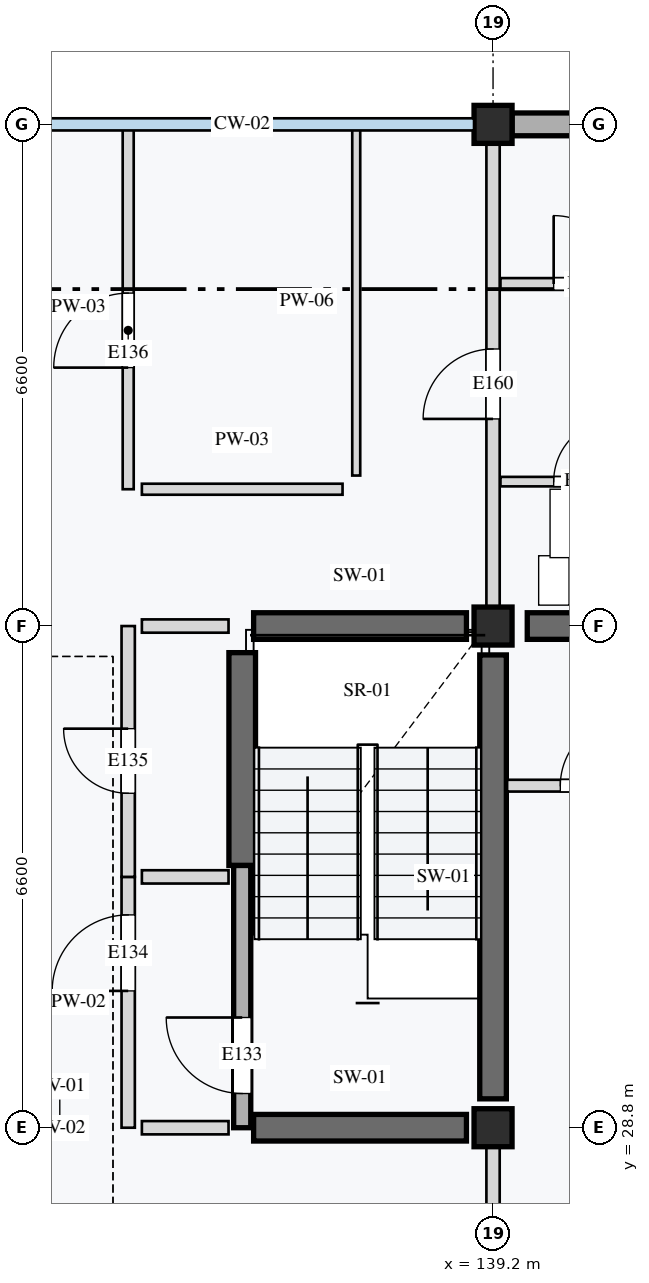
"""IFC4 building model, lengths in metres.
Left out: names, types, materials, properties, quantities, classifications, styles, units other than length and angle.
Written with IfcOpenShell. Run it as: python <this file> out.ifc"""

import sys

from ifc_helpers import new_model, si_unit, direction, frame, frame_2d, origin, origin_2d, place, context, subcontext, project, spatial, rectangle, extrude, element, fill, save


model = new_model("IFC4")
c1 = context("Model", 3, precision=1e-05, world=origin(), true_north=direction((0.0, 1.0)))
c2 = subcontext(c1, "Body", "Model", "MODEL_VIEW")
j1 = project(units=[si_unit("LENGTHUNIT", "METRE"), si_unit("PLANEANGLEUNIT", "RADIAN")], contexts=[c1])
p1 = place(None, origin())
s1 = spatial("IfcSite", under=j1, at=p1, CompositionType="ELEMENT")
p2 = place(p1, origin())
s2 = spatial("IfcBuilding", under=s1, at=p2, CompositionType="ELEMENT")
p3 = place(p2, frame((0.0, 0.0, 8.4)))
s3 = spatial("IfcBuildingStorey", under=s2, at=p3, CompositionType="ELEMENT", Elevation=8.4)
for number, where, z_axis, x_axis in (
    (1, (139.2, 28.8, 0.0), (0.0, 0.0, 1.0), (1.0, 0.0, 0.0)),
    (2, (139.2, 35.4, 0.0), (0.0, 0.0, 1.0), (1.0, 0.0, 0.0)),
    (3, (139.2, 42.0, 0.0), (0.0, 0.0, 1.0), (1.0, 0.0, 0.0)),
):
    element("IfcColumn", number, at=place(p3, frame(where, z_axis=z_axis, x_axis=x_axis)), inside=s3, PredefinedType="COLUMN", context=c2, shape_type="SweptSolid", body=[
        extrude(rectangle(XDim=0.5, YDim=0.5, at=origin_2d()), origin(), (0.0, 0.0, 1.0), 3.2),
    ])
p4 = place(p3, frame((139.2, 29.18, 0.0), z_axis=(0.0, 0.0, 1.0), x_axis=(0.0, 1.0, 0.0)))
e4 = element("IfcWall", 4, at=p4, inside=s3, PredefinedType="SHEAR", context=c2, shape_type="SweptSolid", body=[
    extrude(rectangle(XDim=5.84, YDim=0.35, at=frame_2d((2.92, 0.0))), origin(), (0.0, 0.0, 1.0), 2.96),
])
for number, where, z_axis, x_axis in (
    (5, (135.9, 32.25, 0.0), (0.0, 0.0, 1.0), (0.0, 1.0, 0.0)),
    (6, (136.05, 28.8, 0.0), (0.0, 0.0, 1.0), (1.0, 0.0, 0.0)),
    (7, (136.05, 35.4, 0.0), (0.0, 0.0, 1.0), (1.0, 0.0, 0.0)),
):
    element("IfcWall", number, at=place(p3, frame(where, z_axis=z_axis, x_axis=x_axis)), inside=s3, PredefinedType="SHEAR", context=c2, shape_type="SweptSolid", body=[
        extrude(rectangle(XDim=2.8, YDim=0.35, at=frame_2d((1.4, 0.0))), origin(), (0.0, 0.0, 1.0), 2.96),
    ])
p5 = place(p3, frame((139.65, 35.4, 0.0), z_axis=(0.0, 0.0, 1.0), x_axis=(1.0, 0.0, 0.0)))
e8 = element("IfcWall", 8, at=p5, inside=s3, PredefinedType="SHEAR", context=c2, shape_type="SweptSolid", body=[
    extrude(rectangle(XDim=5.7, YDim=0.35, at=frame_2d((2.85, 0.0))), origin(), (0.0, 0.0, 1.0), 2.96),
])
p6 = place(p3, frame((139.45, 42.0, 0.0), z_axis=(0.0, 0.0, 1.0), x_axis=(1.0, 0.0, 0.0)))
e9 = element("IfcWall", 9, at=p6, inside=s3, PredefinedType="STANDARD", context=c2, shape_type="SweptSolid", body=[
    extrude(rectangle(XDim=4.0, YDim=0.3, at=frame_2d((2.0, 0.0))), origin(), (0.0, 0.0, 1.0), 2.65),
])
p7 = place(p3, frame((135.9, 28.8, 0.0), z_axis=(0.0, 0.0, 1.0), x_axis=(0.0, 1.0, 0.0)))
e10 = element("IfcWall", 10, at=p7, inside=s3, PredefinedType="STANDARD", context=c2, shape_type="SweptSolid", body=[
    extrude(rectangle(XDim=3.45, YDim=0.225, at=frame_2d((1.725, 0.0))), origin(), (0.0, 0.0, 1.0), 2.96),
])
p8 = place(p7, frame((0.45, 0.0, 0.0)))
e11 = element("IfcOpeningElement", 11, at=p8, cuts=e10, PredefinedType="OPENING", context=c2, shape_type="SweptSolid", body=[
    extrude(rectangle(XDim=1.0, YDim=2.1, at=frame_2d((0.5, 1.05))), frame((0.0, 0.123, 0.0), z_axis=(0.0, -1.0, 0.0), x_axis=(1.0, 0.0, 0.0)), (0.0, 0.0, 1.0), 0.245),
])
p9 = place(p3, frame((134.4, 28.8, 0.0), z_axis=(0.0, 0.0, 1.0), x_axis=(0.0, 1.0, 0.0)))
e12 = element("IfcWall", 12, at=p9, inside=s3, PredefinedType="PARTITIONING", context=c2, shape_type="SweptSolid", body=[
    extrude(rectangle(XDim=3.3, YDim=0.175, at=frame_2d((1.65, 0.0))), origin(), (0.0, 0.0, 1.0), 2.96),
])
p10 = place(p9, frame((1.8, 0.0, 0.0)))
e13 = element("IfcOpeningElement", 13, at=p10, cuts=e12, PredefinedType="OPENING", context=c2, shape_type="SweptSolid", body=[
    extrude(rectangle(XDim=1.0, YDim=2.16, at=frame_2d((0.5, 1.08))), frame((0.0, 0.097, 0.0), z_axis=(0.0, -1.0, 0.0), x_axis=(1.0, 0.0, 0.0)), (0.0, 0.0, 1.0), 0.195),
])
p11 = place(p3, frame((134.4, 32.1, 0.0), z_axis=(0.0, 0.0, 1.0), x_axis=(0.0, 1.0, 0.0)))
e14 = element("IfcWall", 14, at=p11, inside=s3, PredefinedType="PARTITIONING", context=c2, shape_type="SweptSolid", body=[
    extrude(rectangle(XDim=3.3, YDim=0.175, at=frame_2d((1.65, 0.0))), origin(), (0.0, 0.0, 1.0), 2.96),
])
p12 = place(p11, frame((1.1, 0.0, 0.0)))
e15 = element("IfcOpeningElement", 15, at=p12, cuts=e14, PredefinedType="OPENING", context=c2, shape_type="SweptSolid", body=[
    extrude(rectangle(XDim=0.85, YDim=2.0, at=frame_2d((0.425, 1.0))), frame((0.0, 0.097, 0.0), z_axis=(0.0, -1.0, 0.0), x_axis=(1.0, 0.0, 0.0)), (0.0, 0.0, 1.0), 0.195),
])
for number, where, z_axis, x_axis in (
    (16, (134.58, 28.8, 0.0), (0.0, 0.0, 1.0), (1.0, 0.0, 0.0)),
    (17, (134.58, 32.1, 0.0), (0.0, 0.0, 1.0), (1.0, 0.0, 0.0)),
    (18, (134.58, 35.4, 0.0), (0.0, 0.0, 1.0), (1.0, 0.0, 0.0)),
):
    element("IfcWall", number, at=place(p3, frame(where, z_axis=z_axis, x_axis=x_axis)), inside=s3, PredefinedType="PARTITIONING", context=c2, shape_type="SweptSolid", body=[
        extrude(rectangle(XDim=1.14, YDim=0.175, at=frame_2d((0.57, 0.0))), origin(), (0.0, 0.0, 1.0), 2.96),
    ])
p13 = place(p3, frame((134.4, 37.2, 0.0), z_axis=(0.0, 0.0, 1.0), x_axis=(0.0, 1.0, 0.0)))
e19 = element("IfcWall", 19, at=p13, inside=s3, PredefinedType="PARTITIONING", context=c2, shape_type="SweptSolid", body=[
    extrude(rectangle(XDim=4.8, YDim=0.145, at=frame_2d((2.4, 0.0))), origin(), (0.0, 0.0, 1.0), 2.96),
])
p14 = place(p13, frame((1.6, 0.0, 0.0)))
e20 = element("IfcOpeningElement", 20, at=p14, cuts=e19, PredefinedType="OPENING", context=c2, shape_type="SweptSolid", body=[
    extrude(rectangle(XDim=0.98, YDim=2.12, at=frame_2d((0.49, 1.06))), frame((0.0, 0.083, 0.0), z_axis=(0.0, -1.0, 0.0), x_axis=(1.0, 0.0, 0.0)), (0.0, 0.0, 1.0), 0.165),
])
p15 = place(p3, frame((137.4, 37.38, 0.0), z_axis=(0.0, 0.0, 1.0), x_axis=(0.0, 1.0, 0.0)))
e21 = element("IfcWall", 21, at=p15, inside=s3, PredefinedType="PARTITIONING", context=c2, shape_type="SweptSolid", body=[
    extrude(rectangle(XDim=4.6, YDim=0.105, at=frame_2d((2.3, 0.0))), origin(), (0.0, 0.0, 1.0), 2.96),
])
p16 = place(p3, frame((134.58, 37.2, 0.0), z_axis=(0.0, 0.0, 1.0), x_axis=(1.0, 0.0, 0.0)))
e22 = element("IfcWall", 22, at=p16, inside=s3, PredefinedType="PARTITIONING", context=c2, shape_type="SweptSolid", body=[
    extrude(rectangle(XDim=2.64, YDim=0.145, at=frame_2d((1.32, 0.0))), origin(), (0.0, 0.0, 1.0), 2.96),
])
p17 = place(p3, frame((139.2, 22.2, 0.0), z_axis=(0.0, 0.0, 1.0), x_axis=(0.0, 1.0, 0.0)))
e23 = element("IfcWall", 23, at=p17, inside=s3, PredefinedType="PARTITIONING", context=c2, shape_type="SweptSolid", body=[
    extrude(rectangle(XDim=6.6, YDim=0.175, at=frame_2d((3.3, 0.0))), origin(), (0.0, 0.0, 1.0), 2.55),
])
p18 = place(p17, frame((3.85, 0.0, 0.0)))
e24 = element("IfcOpeningElement", 24, at=p18, cuts=e23, PredefinedType="OPENING", context=c2, shape_type="SweptSolid", body=[
    extrude(rectangle(XDim=0.95, YDim=2.1, at=frame_2d((0.475, 1.05))), frame((0.0, 0.097, 0.0), z_axis=(0.0, -1.0, 0.0), x_axis=(1.0, 0.0, 0.0)), (0.0, 0.0, 1.0), 0.195),
])
p19 = place(p3, frame((139.385, 33.3, 0.0), z_axis=(0.0, 0.0, 1.0), x_axis=(1.0, 0.0, 0.0)))
e25 = element("IfcWall", 25, at=p19, inside=s3, PredefinedType="PARTITIONING", context=c2, shape_type="SweptSolid", body=[
    extrude(rectangle(XDim=2.215, YDim=0.155, at=frame_2d((1.107, 0.0))), origin(), (0.0, 0.0, 1.0), 2.96),
])
p20 = place(p19, frame((0.7, 0.0, 0.0)))
e26 = element("IfcOpeningElement", 26, at=p20, cuts=e25, PredefinedType="OPENING", context=c2, shape_type="SweptSolid", body=[
    extrude(rectangle(XDim=0.88, YDim=2.1, at=frame_2d((0.44, 1.05))), frame((0.0, 0.087, 0.0), z_axis=(0.0, -1.0, 0.0), x_axis=(1.0, 0.0, 0.0)), (0.0, 0.0, 1.0), 0.175),
])
p21 = place(p3, frame((139.2, 35.4, 0.0), z_axis=(0.0, 0.0, 1.0), x_axis=(0.0, 1.0, 0.0)))
e27 = element("IfcWall", 27, at=p21, inside=s3, PredefinedType="PARTITIONING", context=c2, shape_type="SweptSolid", body=[
    extrude(rectangle(XDim=6.6, YDim=0.175, at=frame_2d((3.3, 0.0))), origin(), (0.0, 0.0, 1.0), 2.55),
])
p22 = place(p21, frame((2.725, 0.0, 0.0)))
e28 = element("IfcOpeningElement", 28, at=p22, cuts=e27, PredefinedType="OPENING", context=c2, shape_type="SweptSolid", body=[
    extrude(rectangle(XDim=0.92, YDim=2.14, at=frame_2d((0.46, 1.07))), frame((0.0, 0.097, 0.0), z_axis=(0.0, -1.0, 0.0), x_axis=(1.0, 0.0, 0.0)), (0.0, 0.0, 1.0), 0.195),
])
p23 = place(p3, frame((139.298, 37.3, 0.0), z_axis=(0.0, 0.0, 1.0), x_axis=(1.0, 0.0, 0.0)))
e29 = element("IfcWall", 29, at=p23, inside=s3, PredefinedType="PARTITIONING", context=c2, shape_type="SweptSolid", body=[
    extrude(rectangle(XDim=2.302, YDim=0.125, at=frame_2d((1.151, 0.0))), origin(), (0.0, 0.0, 1.0), 2.96),
])
p24 = place(p23, frame((0.7, 0.0, 0.0)))
e30 = element("IfcOpeningElement", 30, at=p24, cuts=e29, PredefinedType="OPENING", context=c2, shape_type="SweptSolid", body=[
    extrude(rectangle(XDim=0.82, YDim=2.05, at=frame_2d((0.41, 1.025))), frame((0.0, 0.073, 0.0), z_axis=(0.0, -1.0, 0.0), x_axis=(1.0, 0.0, 0.0)), (0.0, 0.0, 1.0), 0.145),
])
p25 = place(p3, frame((139.298, 39.9, 0.0), z_axis=(0.0, 0.0, 1.0), x_axis=(1.0, 0.0, 0.0)))
e31 = element("IfcWall", 31, at=p25, inside=s3, PredefinedType="PARTITIONING", context=c2, shape_type="SweptSolid", body=[
    extrude(rectangle(XDim=2.302, YDim=0.155, at=frame_2d((1.151, 0.0))), origin(), (0.0, 0.0, 1.0), 2.96),
])
p26 = place(p25, frame((0.7, 0.0, 0.0)))
e32 = element("IfcOpeningElement", 32, at=p26, cuts=e31, PredefinedType="OPENING", context=c2, shape_type="SweptSolid", body=[
    extrude(rectangle(XDim=0.9, YDim=2.1, at=frame_2d((0.45, 1.05))), frame((0.0, 0.087, 0.0), z_axis=(0.0, -1.0, 0.0), x_axis=(1.0, 0.0, 0.0)), (0.0, 0.0, 1.0), 0.175),
])
p27 = place(p8, origin())
e33 = element("IfcDoor", 33, at=p27, inside=s3, OperationType="SINGLE_SWING_RIGHT", PredefinedType="DOOR", context=c2, shape_type="SweptSolid", body=[
    extrude(rectangle(XDim=1.0, YDim=2.1, at=frame_2d((0.5, 1.05))), frame((0.0, 0.025, 0.0), z_axis=(0.0, -1.0, 0.0), x_axis=(1.0, 0.0, 0.0)), (0.0, 0.0, 1.0), 0.05),
])
fill(e11, e33)
p28 = place(p10, origin())
e34 = element("IfcDoor", 34, at=p28, inside=s3, OperationType="SINGLE_SWING_LEFT", PredefinedType="DOOR", context=c2, shape_type="SweptSolid", body=[
    extrude(rectangle(XDim=1.0, YDim=2.16, at=frame_2d((0.5, 1.08))), frame((0.0, 0.025, 0.0), z_axis=(0.0, -1.0, 0.0), x_axis=(1.0, 0.0, 0.0)), (0.0, 0.0, 1.0), 0.05),
])
fill(e13, e34)
p29 = place(p12, origin())
e35 = element("IfcDoor", 35, at=p29, inside=s3, OperationType="SINGLE_SWING_RIGHT", PredefinedType="DOOR", context=c2, shape_type="SweptSolid", body=[
    extrude(rectangle(XDim=0.85, YDim=2.0, at=frame_2d((0.425, 1.0))), frame((0.0, 0.025, 0.0), z_axis=(0.0, -1.0, 0.0), x_axis=(1.0, 0.0, 0.0)), (0.0, 0.0, 1.0), 0.05),
])
fill(e15, e35)
p30 = place(p14, origin())
e36 = element("IfcDoor", 36, at=p30, inside=s3, OperationType="SINGLE_SWING_LEFT", PredefinedType="DOOR", context=c2, shape_type="SweptSolid", body=[
    extrude(rectangle(XDim=0.98, YDim=2.12, at=frame_2d((0.49, 1.06))), frame((0.0, 0.025, 0.0), z_axis=(0.0, -1.0, 0.0), x_axis=(1.0, 0.0, 0.0)), (0.0, 0.0, 1.0), 0.05),
])
fill(e20, e36)
p31 = place(p20, origin())
e37 = element("IfcDoor", 37, at=p31, inside=s3, OperationType="SINGLE_SWING_RIGHT", PredefinedType="DOOR", context=c2, shape_type="SweptSolid", body=[
    extrude(rectangle(XDim=0.88, YDim=2.1, at=frame_2d((0.44, 1.05))), frame((0.0, 0.025, 0.0), z_axis=(0.0, -1.0, 0.0), x_axis=(1.0, 0.0, 0.0)), (0.0, 0.0, 1.0), 0.05),
])
fill(e26, e37)
p32 = place(p22, origin())
e38 = element("IfcDoor", 38, at=p32, inside=s3, OperationType="SINGLE_SWING_LEFT", PredefinedType="DOOR", context=c2, shape_type="SweptSolid", body=[
    extrude(rectangle(XDim=0.92, YDim=2.14, at=frame_2d((0.46, 1.07))), frame((0.0, 0.025, 0.0), z_axis=(0.0, -1.0, 0.0), x_axis=(1.0, 0.0, 0.0)), (0.0, 0.0, 1.0), 0.05),
])
fill(e28, e38)
p33 = place(p24, origin())
e39 = element("IfcDoor", 39, at=p33, inside=s3, OperationType="SINGLE_SWING_RIGHT", PredefinedType="DOOR", context=c2, shape_type="SweptSolid", body=[
    extrude(rectangle(XDim=0.82, YDim=2.05, at=frame_2d((0.41, 1.025))), frame((0.0, 0.025, 0.0), z_axis=(0.0, -1.0, 0.0), x_axis=(1.0, 0.0, 0.0)), (0.0, 0.0, 1.0), 0.05),
])
fill(e30, e39)
p34 = place(p26, origin())
e40 = element("IfcDoor", 40, at=p34, inside=s3, OperationType="SINGLE_SWING_LEFT", PredefinedType="DOOR", context=c2, shape_type="SweptSolid", body=[
    extrude(rectangle(XDim=0.9, YDim=2.1, at=frame_2d((0.45, 1.05))), frame((0.0, 0.025, 0.0), z_axis=(0.0, -1.0, 0.0), x_axis=(1.0, 0.0, 0.0)), (0.0, 0.0, 1.0), 0.05),
])
fill(e32, e40)
save(model, sys.argv[1])
